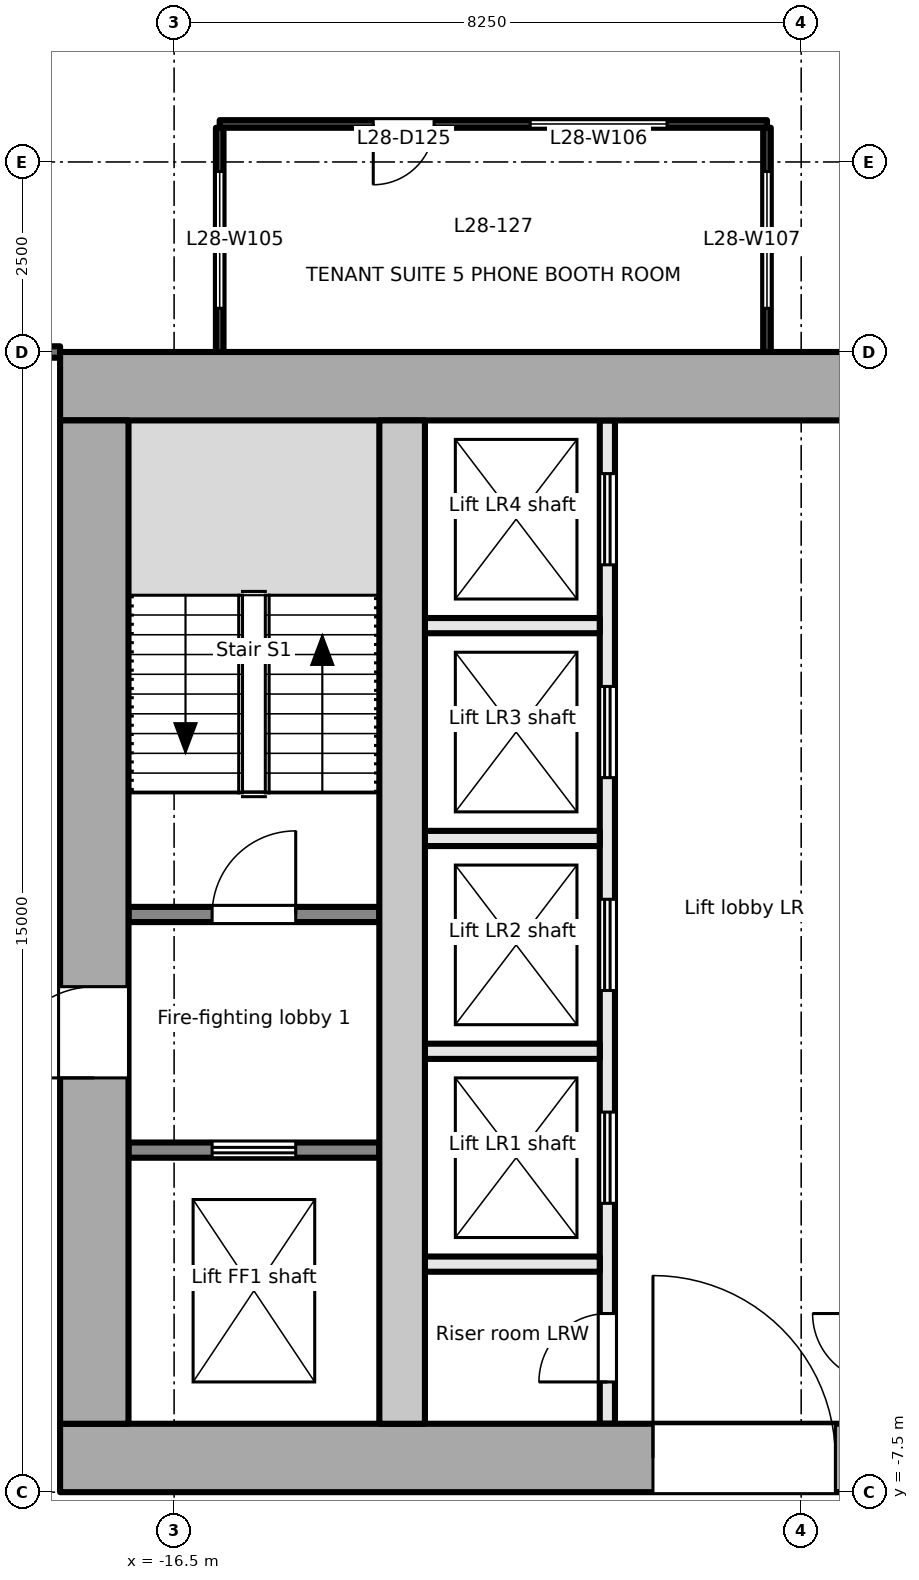
"""IFC4 building model, lengths in metres.
Left out: names, types, materials, properties, quantities, classifications, styles, units other than length and angle.
Written with IfcOpenShell. Run it as: python <this file> out.ifc"""

import sys

from ifc_helpers import new_model, si_unit, direction, frame, frame_2d, origin, place, context, subcontext, project, spatial, rectangle, extrude, element, fill, save


model = new_model("IFC4")
c1 = context("Model", 3, precision=1e-05, world=origin(), true_north=direction((0.0, 1.0)))
c2 = subcontext(c1, "Body", "Model", "MODEL_VIEW")
j1 = project(units=[si_unit("LENGTHUNIT", "METRE"), si_unit("PLANEANGLEUNIT", "RADIAN")], contexts=[c1])
p1 = place(None, origin())
s1 = spatial("IfcSite", under=j1, at=p1, CompositionType="ELEMENT")
p2 = place(p1, origin())
s2 = spatial("IfcBuilding", under=s1, at=p2, CompositionType="ELEMENT")
p3 = place(p2, frame((0.0, 0.0, 126.1)))
s3 = spatial("IfcBuildingStorey", under=s2, at=p3, CompositionType="ELEMENT", Elevation=126.1)
p4 = place(p3, frame((-18.0, -7.05, -0.2), z_axis=(0.0, 0.0, 1.0), x_axis=(1.0, 0.0, 0.0)))
e1 = element("IfcWall", 1, at=p4, inside=s3, PredefinedType="SHEAR", context=c2, shape_type="SweptSolid", body=[
    extrude(rectangle(XDim=36.0, YDim=0.9, at=frame_2d((18.0, 0.0))), origin(), (0.0, 0.0, 1.0), 4.0),
])
p5 = place(p4, frame((7.8, 0.0, 0.2)))
e2 = element("IfcOpeningElement", 2, at=p5, cuts=e1, PredefinedType="OPENING", context=c2, shape_type="SweptSolid", body=[
    extrude(rectangle(XDim=2.4, YDim=2.1, at=frame_2d((1.2, 1.05))), frame((0.0, 0.46, 0.0), z_axis=(0.0, -1.0, 0.0), x_axis=(1.0, 0.0, 0.0)), (0.0, 0.0, 1.0), 0.921),
])
p6 = place(p4, frame((17.4, 0.0, 0.2)))
e3 = element("IfcOpeningElement", 3, at=p6, cuts=e1, PredefinedType="OPENING", context=c2, shape_type="SweptSolid", body=[
    extrude(rectangle(XDim=1.2, YDim=2.1, at=frame_2d((0.6, 1.05))), frame((0.0, 0.46, 0.0), z_axis=(0.0, -1.0, 0.0), x_axis=(1.0, 0.0, 0.0)), (0.0, 0.0, 1.0), 0.921),
])
p7 = place(p4, frame((26.1, 0.0, 0.2)))
e4 = element("IfcOpeningElement", 4, at=p7, cuts=e1, PredefinedType="OPENING", context=c2, shape_type="SweptSolid", body=[
    extrude(rectangle(XDim=2.4, YDim=2.1, at=frame_2d((1.2, 1.05))), frame((0.0, 0.46, 0.0), z_axis=(0.0, -1.0, 0.0), x_axis=(1.0, 0.0, 0.0)), (0.0, 0.0, 1.0), 0.921),
])
p8 = place(p3, frame((-18.0, 7.05, -0.2), z_axis=(0.0, 0.0, 1.0), x_axis=(1.0, 0.0, 0.0)))
e5 = element("IfcWall", 5, at=p8, inside=s3, PredefinedType="SHEAR", context=c2, shape_type="SweptSolid", body=[
    extrude(rectangle(XDim=36.0, YDim=0.9, at=frame_2d((18.0, 0.0))), origin(), (0.0, 0.0, 1.0), 4.0),
])
p9 = place(p3, frame((-17.55, -6.6, -0.2), z_axis=(0.0, 0.0, 1.0), x_axis=(0.0, 1.0, 0.0)))
e6 = element("IfcWall", 6, at=p9, inside=s3, PredefinedType="SHEAR", context=c2, shape_type="SweptSolid", body=[
    extrude(rectangle(XDim=13.2, YDim=0.9, at=frame_2d((6.6, 0.0))), origin(), (0.0, 0.0, 1.0), 4.0),
])
p10 = place(p9, frame((4.55, 0.0, 0.2)))
e7 = element("IfcOpeningElement", 7, at=p10, cuts=e6, PredefinedType="OPENING", context=c2, shape_type="SweptSolid", body=[
    extrude(rectangle(XDim=1.2, YDim=2.1, at=frame_2d((0.6, 1.05))), frame((0.0, 0.46, 0.0), z_axis=(0.0, -1.0, 0.0), x_axis=(1.0, 0.0, 0.0)), (0.0, 0.0, 1.0), 0.921),
])
p11 = place(p3, frame((-13.5, -6.6, -0.2), z_axis=(0.0, 0.0, 1.0), x_axis=(0.0, 1.0, 0.0)))
e8 = element("IfcWall", 8, at=p11, inside=s3, PredefinedType="SHEAR", context=c2, shape_type="SweptSolid", body=[
    extrude(rectangle(XDim=13.2, YDim=0.6, at=frame_2d((6.6, 0.0))), origin(), (0.0, 0.0, 1.0), 4.0),
])
p12 = place(p3, frame((-17.1, -3.0, 0.0), z_axis=(0.0, 0.0, 1.0), x_axis=(1.0, 0.0, 0.0)))
e9 = element("IfcWall", 9, at=p12, inside=s3, PredefinedType="PARTITIONING", context=c2, shape_type="SweptSolid", body=[
    extrude(rectangle(XDim=3.3, YDim=0.2, at=frame_2d((1.65, 0.0))), origin(), (0.0, 0.0, 1.0), 3.8),
])
p13 = place(p12, frame((1.1, 0.0, 0.0)))
e10 = element("IfcOpeningElement", 10, at=p13, cuts=e9, PredefinedType="OPENING", context=c2, shape_type="SweptSolid", body=[
    extrude(rectangle(XDim=1.1, YDim=2.1, at=frame_2d((0.55, 1.05))), frame((0.0, 0.111, 0.0), z_axis=(0.0, -1.0, 0.0), x_axis=(1.0, 0.0, 0.0)), (0.0, 0.0, 1.0), 0.221),
])
p14 = place(p3, frame((-17.1, 0.1, 0.0), z_axis=(0.0, 0.0, 1.0), x_axis=(1.0, 0.0, 0.0)))
e11 = element("IfcWall", 11, at=p14, inside=s3, PredefinedType="PARTITIONING", context=c2, shape_type="SweptSolid", body=[
    extrude(rectangle(XDim=3.3, YDim=0.2, at=frame_2d((1.65, 0.0))), origin(), (0.0, 0.0, 1.0), 3.8),
])
p15 = place(p14, frame((1.1, 0.0, 0.0)))
e12 = element("IfcOpeningElement", 12, at=p15, cuts=e11, PredefinedType="OPENING", context=c2, shape_type="SweptSolid", body=[
    extrude(rectangle(XDim=1.1, YDim=2.1, at=frame_2d((0.55, 1.05))), frame((0.0, 0.111, 0.0), z_axis=(0.0, -1.0, 0.0), x_axis=(1.0, 0.0, 0.0)), (0.0, 0.0, 1.0), 0.221),
])
p16 = place(p3, frame((-10.8, -6.6, 0.0), z_axis=(0.0, 0.0, 1.0), x_axis=(0.0, 1.0, 0.0)))
e13 = element("IfcWall", 13, at=p16, inside=s3, PredefinedType="PARTITIONING", context=c2, shape_type="SweptSolid", body=[
    extrude(rectangle(XDim=13.2, YDim=0.2, at=frame_2d((6.6, 0.0))), origin(), (0.0, 0.0, 1.0), 3.8),
])
p17 = place(p16, frame((0.55, 0.0, 0.0)))
e14 = element("IfcOpeningElement", 14, at=p17, cuts=e13, PredefinedType="OPENING", context=c2, shape_type="SweptSolid", body=[
    extrude(rectangle(XDim=0.9, YDim=2.1, at=frame_2d((0.45, 1.05))), frame((0.0, 0.111, 0.0), z_axis=(0.0, -1.0, 0.0), x_axis=(1.0, 0.0, 0.0)), (0.0, 0.0, 1.0), 0.221),
])
p18 = place(p16, frame((2.9, 0.0, 0.0)))
e15 = element("IfcOpeningElement", 15, at=p18, cuts=e13, PredefinedType="OPENING", context=c2, shape_type="SweptSolid", body=[
    extrude(rectangle(XDim=1.2, YDim=2.1, at=frame_2d((0.6, 1.05))), frame((0.0, 0.111, 0.0), z_axis=(0.0, -1.0, 0.0), x_axis=(1.0, 0.0, 0.0)), (0.0, 0.0, 1.0), 0.221),
])
p19 = place(p16, frame((5.7, 0.0, 0.0)))
e16 = element("IfcOpeningElement", 16, at=p19, cuts=e13, PredefinedType="OPENING", context=c2, shape_type="SweptSolid", body=[
    extrude(rectangle(XDim=1.2, YDim=2.1, at=frame_2d((0.6, 1.05))), frame((0.0, 0.111, 0.0), z_axis=(0.0, -1.0, 0.0), x_axis=(1.0, 0.0, 0.0)), (0.0, 0.0, 1.0), 0.221),
])
p20 = place(p16, frame((8.5, 0.0, 0.0)))
e17 = element("IfcOpeningElement", 17, at=p20, cuts=e13, PredefinedType="OPENING", context=c2, shape_type="SweptSolid", body=[
    extrude(rectangle(XDim=1.2, YDim=2.1, at=frame_2d((0.6, 1.05))), frame((0.0, 0.111, 0.0), z_axis=(0.0, -1.0, 0.0), x_axis=(1.0, 0.0, 0.0)), (0.0, 0.0, 1.0), 0.221),
])
p21 = place(p16, frame((11.3, 0.0, 0.0)))
e18 = element("IfcOpeningElement", 18, at=p21, cuts=e13, PredefinedType="OPENING", context=c2, shape_type="SweptSolid", body=[
    extrude(rectangle(XDim=1.2, YDim=2.1, at=frame_2d((0.6, 1.05))), frame((0.0, 0.111, 0.0), z_axis=(0.0, -1.0, 0.0), x_axis=(1.0, 0.0, 0.0)), (0.0, 0.0, 1.0), 0.221),
])
for number, where, z_axis, x_axis in (
    (19, (-13.2, -1.7, 0.0), (0.0, 0.0, 1.0), (1.0, 0.0, 0.0)),
    (20, (-13.2, 1.1, 0.0), (0.0, 0.0, 1.0), (1.0, 0.0, 0.0)),
    (21, (-13.2, 3.9, 0.0), (0.0, 0.0, 1.0), (1.0, 0.0, 0.0)),
    (22, (-13.2, -4.5, 0.0), (0.0, 0.0, 1.0), (1.0, 0.0, 0.0)),
):
    element("IfcWall", number, at=place(p3, frame(where, z_axis=z_axis, x_axis=x_axis)), inside=s3, PredefinedType="PARTITIONING", context=c2, shape_type="SweptSolid", body=[
        extrude(rectangle(XDim=2.3, YDim=0.2, at=frame_2d((1.15, 0.0))), origin(), (0.0, 0.0, 1.0), 3.8),
    ])
p22 = place(p3, frame((-20.625, 7.5, 0.0), z_axis=(0.0, 0.0, 1.0), x_axis=(1.0, 0.0, 0.0)))
e23 = element("IfcWall", 23, at=p22, inside=s3, PredefinedType="PARTITIONING", context=c2, shape_type="SweptSolid", body=[
    extrude(rectangle(XDim=2.625, YDim=0.15, at=frame_2d((1.312, 0.0))), origin(), (0.0, 0.0, 1.0), 3.8),
])
p23 = place(p22, frame((0.556, 0.0, 0.0)))
e24 = element("IfcOpeningElement", 24, at=p23, cuts=e23, PredefinedType="OPENING", context=c2, shape_type="SweptSolid", body=[
    extrude(rectangle(XDim=0.9, YDim=2.1, at=frame_2d((0.45, 1.05))), frame((0.0, 0.085, 0.0), z_axis=(0.0, -1.0, 0.0), x_axis=(1.0, 0.0, 0.0)), (0.0, 0.0, 1.0), 0.171),
])
p24 = place(p3, frame((-15.9, 10.45, 0.0), z_axis=(0.0, 0.0, 1.0), x_axis=(0.0, -1.0, 0.0)))
e25 = element("IfcWall", 25, at=p24, inside=s3, PredefinedType="PARTITIONING", context=c2, shape_type="SweptSolid", body=[
    extrude(rectangle(XDim=2.95, YDim=0.1, at=frame_2d((1.475, 0.0))), origin(), (0.0, 0.0, 1.0), 3.8),
])
p25 = place(p24, frame((0.575, 0.0, 0.9)))
e26 = element("IfcOpeningElement", 26, at=p25, cuts=e25, PredefinedType="OPENING", context=c2, shape_type="SweptSolid", body=[
    extrude(rectangle(XDim=1.8, YDim=1.2, at=frame_2d((0.9, 0.6))), frame((0.0, 0.061, 0.0), z_axis=(0.0, -1.0, 0.0), x_axis=(1.0, 0.0, 0.0)), (0.0, 0.0, 1.0), 0.121),
])
p26 = place(p3, frame((-8.7, 10.5, 0.0), z_axis=(0.0, 0.0, 1.0), x_axis=(-1.0, 0.0, 0.0)))
e27 = element("IfcWall", 27, at=p26, inside=s3, PredefinedType="PARTITIONING", context=c2, shape_type="SweptSolid", body=[
    extrude(rectangle(XDim=7.2, YDim=0.1, at=frame_2d((3.6, 0.0))), origin(), (0.0, 0.0, 1.0), 3.5),
])
p27 = place(p26, frame((4.38, 0.0, 0.0)))
e28 = element("IfcOpeningElement", 28, at=p27, cuts=e27, PredefinedType="OPENING", context=c2, shape_type="SweptSolid", body=[
    extrude(rectangle(XDim=0.8, YDim=2.1, at=frame_2d((0.4, 1.05))), frame((0.0, 0.061, 0.0), z_axis=(0.0, -1.0, 0.0), x_axis=(1.0, 0.0, 0.0)), (0.0, 0.0, 1.0), 0.121),
])
p28 = place(p26, frame((1.315, 0.0, 0.9)))
e29 = element("IfcOpeningElement", 29, at=p28, cuts=e27, PredefinedType="OPENING", context=c2, shape_type="SweptSolid", body=[
    extrude(rectangle(XDim=1.8, YDim=1.2, at=frame_2d((0.9, 0.6))), frame((0.0, 0.061, 0.0), z_axis=(0.0, -1.0, 0.0), x_axis=(1.0, 0.0, 0.0)), (0.0, 0.0, 1.0), 0.121),
])
p29 = place(p3, frame((-8.7, 7.5, 0.0), z_axis=(0.0, 0.0, 1.0), x_axis=(0.0, 1.0, 0.0)))
e30 = element("IfcWall", 30, at=p29, inside=s3, PredefinedType="PARTITIONING", context=c2, shape_type="SweptSolid", body=[
    extrude(rectangle(XDim=2.95, YDim=0.1, at=frame_2d((1.475, 0.0))), origin(), (0.0, 0.0, 1.0), 3.8),
])
p30 = place(p29, frame((0.575, 0.0, 0.9)))
e31 = element("IfcOpeningElement", 31, at=p30, cuts=e30, PredefinedType="OPENING", context=c2, shape_type="SweptSolid", body=[
    extrude(rectangle(XDim=1.8, YDim=1.2, at=frame_2d((0.9, 0.6))), frame((0.0, 0.061, 0.0), z_axis=(0.0, -1.0, 0.0), x_axis=(1.0, 0.0, 0.0)), (0.0, 0.0, 1.0), 0.121),
])
p31 = place(p13, origin())
e32 = element("IfcDoor", 32, at=p31, inside=s3, OperationType="DOUBLE_DOOR_SLIDING", PredefinedType="DOOR", context=c2, shape_type="SweptSolid", body=[
    extrude(rectangle(XDim=1.1, YDim=2.1, at=frame_2d((0.55, 1.05))), frame((0.0, 0.025, 0.0), z_axis=(0.0, -1.0, 0.0), x_axis=(1.0, 0.0, 0.0)), (0.0, 0.0, 1.0), 0.05),
])
fill(e10, e32)
p32 = place(p10, origin())
e33 = element("IfcDoor", 33, at=p32, inside=s3, OperationType="SINGLE_SWING_LEFT", PredefinedType="DOOR", context=c2, shape_type="SweptSolid", body=[
    extrude(rectangle(XDim=1.2, YDim=2.1, at=frame_2d((0.6, 1.05))), frame((0.0, 0.025, 0.0), z_axis=(0.0, -1.0, 0.0), x_axis=(1.0, 0.0, 0.0)), (0.0, 0.0, 1.0), 0.05),
])
fill(e7, e33)
p33 = place(p15, origin())
e34 = element("IfcDoor", 34, at=p33, inside=s3, OperationType="SINGLE_SWING_RIGHT", PredefinedType="DOOR", context=c2, shape_type="SweptSolid", body=[
    extrude(rectangle(XDim=1.1, YDim=2.1, at=frame_2d((0.55, 1.05))), frame((0.0, 0.025, 0.0), z_axis=(0.0, -1.0, 0.0), x_axis=(1.0, 0.0, 0.0)), (0.0, 0.0, 1.0), 0.05),
])
fill(e12, e34)
p34 = place(p17, origin())
e35 = element("IfcDoor", 35, at=p34, inside=s3, OperationType="SINGLE_SWING_LEFT", PredefinedType="DOOR", context=c2, shape_type="SweptSolid", body=[
    extrude(rectangle(XDim=0.9, YDim=2.1, at=frame_2d((0.45, 1.05))), frame((0.0, 0.025, 0.0), z_axis=(0.0, -1.0, 0.0), x_axis=(1.0, 0.0, 0.0)), (0.0, 0.0, 1.0), 0.05),
])
fill(e14, e35)
p35 = place(p18, origin())
e36 = element("IfcDoor", 36, at=p35, inside=s3, OperationType="DOUBLE_DOOR_SLIDING", PredefinedType="DOOR", context=c2, shape_type="SweptSolid", body=[
    extrude(rectangle(XDim=1.2, YDim=2.1, at=frame_2d((0.6, 1.05))), frame((0.0, 0.025, 0.0), z_axis=(0.0, -1.0, 0.0), x_axis=(1.0, 0.0, 0.0)), (0.0, 0.0, 1.0), 0.05),
])
fill(e15, e36)
p36 = place(p19, origin())
e37 = element("IfcDoor", 37, at=p36, inside=s3, OperationType="DOUBLE_DOOR_SLIDING", PredefinedType="DOOR", context=c2, shape_type="SweptSolid", body=[
    extrude(rectangle(XDim=1.2, YDim=2.1, at=frame_2d((0.6, 1.05))), frame((0.0, 0.025, 0.0), z_axis=(0.0, -1.0, 0.0), x_axis=(1.0, 0.0, 0.0)), (0.0, 0.0, 1.0), 0.05),
])
fill(e16, e37)
p37 = place(p20, origin())
e38 = element("IfcDoor", 38, at=p37, inside=s3, OperationType="DOUBLE_DOOR_SLIDING", PredefinedType="DOOR", context=c2, shape_type="SweptSolid", body=[
    extrude(rectangle(XDim=1.2, YDim=2.1, at=frame_2d((0.6, 1.05))), frame((0.0, 0.025, 0.0), z_axis=(0.0, -1.0, 0.0), x_axis=(1.0, 0.0, 0.0)), (0.0, 0.0, 1.0), 0.05),
])
fill(e17, e38)
p38 = place(p21, origin())
e39 = element("IfcDoor", 39, at=p38, inside=s3, OperationType="DOUBLE_DOOR_SLIDING", PredefinedType="DOOR", context=c2, shape_type="SweptSolid", body=[
    extrude(rectangle(XDim=1.2, YDim=2.1, at=frame_2d((0.6, 1.05))), frame((0.0, 0.025, 0.0), z_axis=(0.0, -1.0, 0.0), x_axis=(1.0, 0.0, 0.0)), (0.0, 0.0, 1.0), 0.05),
])
fill(e18, e39)
p39 = place(p5, origin())
e40 = element("IfcDoor", 40, at=p39, inside=s3, OperationType="DOUBLE_DOOR_DOUBLE_SWING", PredefinedType="DOOR", context=c2, shape_type="SweptSolid", body=[
    extrude(rectangle(XDim=2.4, YDim=2.1, at=frame_2d((1.2, 1.05))), frame((0.0, 0.025, 0.0), z_axis=(0.0, -1.0, 0.0), x_axis=(1.0, 0.0, 0.0)), (0.0, 0.0, 1.0), 0.05),
])
fill(e2, e40)
p40 = place(p27, origin())
e41 = element("IfcDoor", 41, at=p40, inside=s3, OperationType="SINGLE_SWING_RIGHT", PredefinedType="DOOR", context=c2, shape_type="SweptSolid", body=[
    extrude(rectangle(XDim=0.8, YDim=2.1, at=frame_2d((0.4, 1.05))), frame((0.0, 0.025, 0.0), z_axis=(0.0, -1.0, 0.0), x_axis=(1.0, 0.0, 0.0)), (0.0, 0.0, 1.0), 0.05),
])
fill(e28, e41)
p41 = place(p25, origin())
e42 = element("IfcWindow", 42, at=p41, inside=s3, PartitioningType="SINGLE_PANEL", PredefinedType="WINDOW", context=c2, shape_type="SweptSolid", body=[
    extrude(rectangle(XDim=1.8, YDim=1.2, at=frame_2d((0.9, 0.6))), frame((0.0, 0.03, 0.0), z_axis=(0.0, -1.0, 0.0), x_axis=(1.0, 0.0, 0.0)), (0.0, 0.0, 1.0), 0.06),
])
fill(e26, e42)
p42 = place(p28, origin())
e43 = element("IfcWindow", 43, at=p42, inside=s3, PartitioningType="SINGLE_PANEL", PredefinedType="WINDOW", context=c2, shape_type="SweptSolid", body=[
    extrude(rectangle(XDim=1.8, YDim=1.2, at=frame_2d((0.9, 0.6))), frame((0.0, 0.03, 0.0), z_axis=(0.0, -1.0, 0.0), x_axis=(1.0, 0.0, 0.0)), (0.0, 0.0, 1.0), 0.06),
])
fill(e29, e43)
p43 = place(p30, origin())
e44 = element("IfcWindow", 44, at=p43, inside=s3, PartitioningType="SINGLE_PANEL", PredefinedType="WINDOW", context=c2, shape_type="SweptSolid", body=[
    extrude(rectangle(XDim=1.8, YDim=1.2, at=frame_2d((0.9, 0.6))), frame((0.0, 0.03, 0.0), z_axis=(0.0, -1.0, 0.0), x_axis=(1.0, 0.0, 0.0)), (0.0, 0.0, 1.0), 0.06),
])
fill(e31, e44)
save(model, sys.argv[1])
